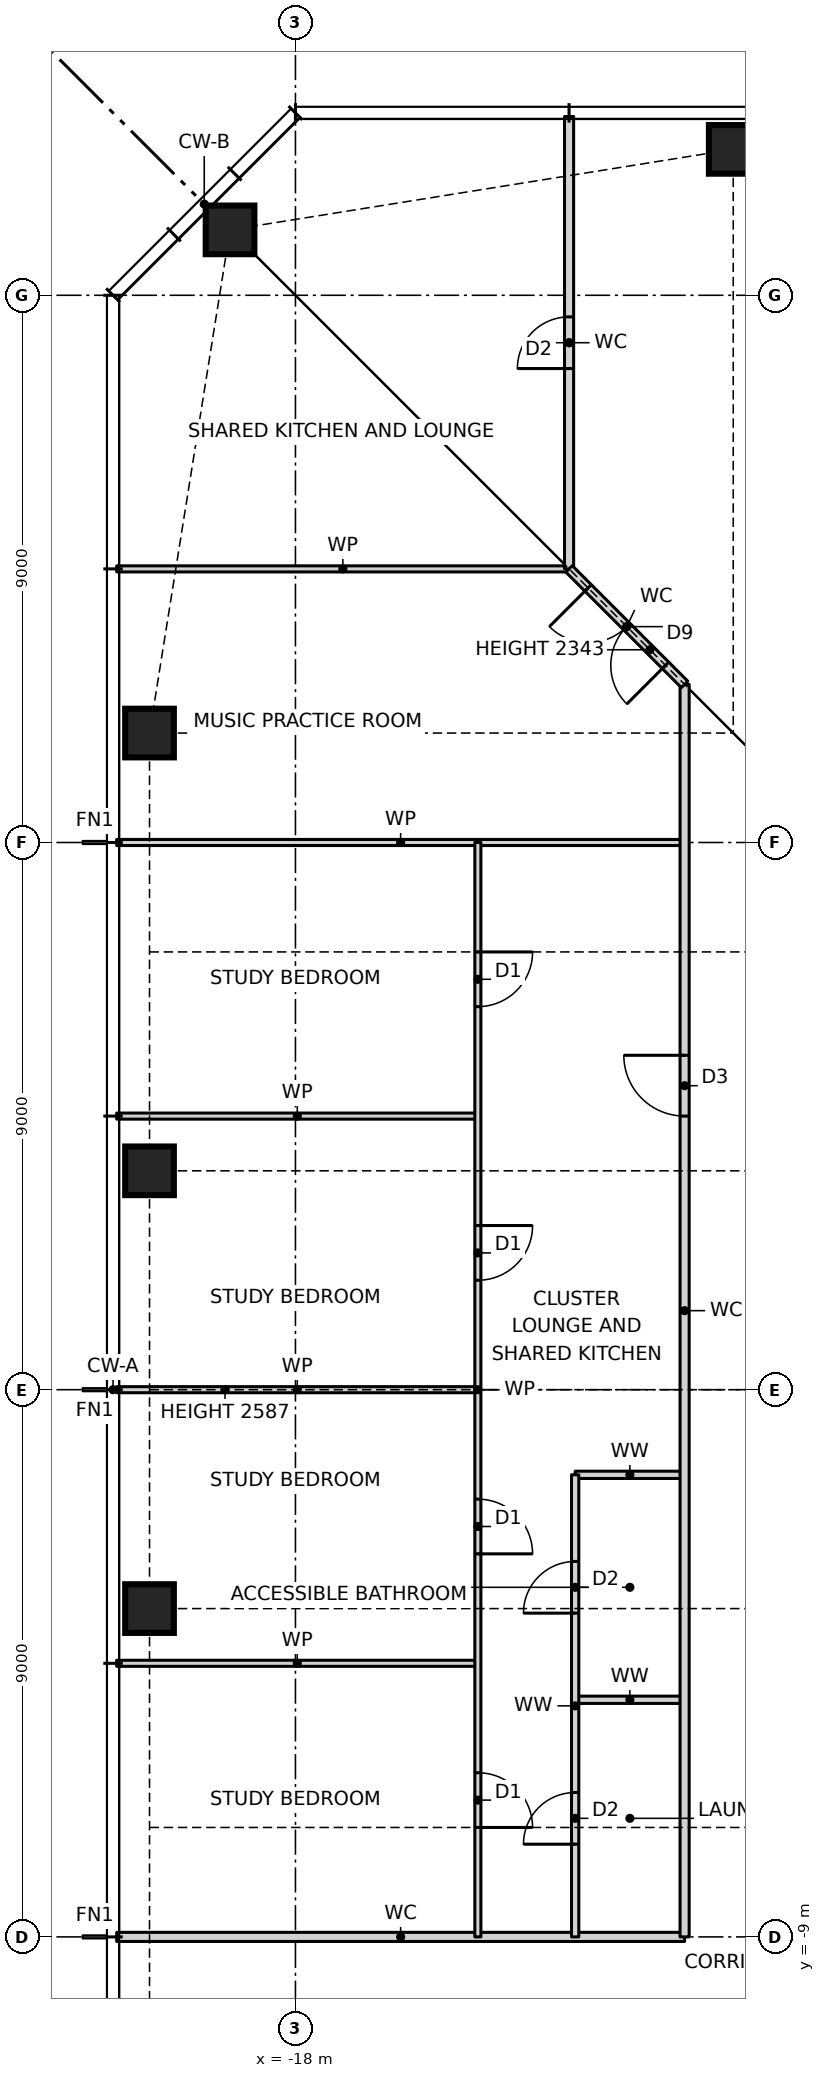
"""IFC4 building model, lengths in metres.
Left out: names, types, materials, properties, quantities, classifications, styles, units other than length and angle.
Written with IfcOpenShell. Run it as: python <this file> out.ifc"""

import sys

from ifc_helpers import new_model, si_unit, direction, frame, frame_2d, origin, origin_2d, place, context, subcontext, project, spatial, rectangle, hollow_rectangle, extrude, element, fill, save


model = new_model("IFC4")
c1 = context("Model", 3, precision=1e-05, world=origin(), true_north=direction((0.0, 1.0)))
c2 = subcontext(c1, "Body", "Model", "MODEL_VIEW")
j1 = project(units=[si_unit("LENGTHUNIT", "METRE"), si_unit("PLANEANGLEUNIT", "RADIAN")], contexts=[c1])
p1 = place(None, origin())
s1 = spatial("IfcSite", under=j1, at=p1, CompositionType="ELEMENT")
p2 = place(p1, origin())
s2 = spatial("IfcBuilding", under=s1, at=p2, CompositionType="ELEMENT")
p3 = place(p2, frame((0.0, 0.0, 112.0)))
s3 = spatial("IfcBuildingStorey", under=s2, at=p3, CompositionType="ELEMENT", Elevation=112.0)
for number, where, z_axis, x_axis in (
    (1, (-10.8, 20.4, 0.0), (0.0, 0.0, 1.0), (1.0, 0.0, 0.0)),
    (2, (-19.076, 19.076, 0.0), (0.0, 0.0, 1.0), (1.0, 0.0, 0.0)),
    (3, (-20.4, 10.8, 0.0), (0.0, 0.0, 1.0), (1.0, 0.0, 0.0)),
    (4, (-20.4, 3.6, 0.0), (0.0, 0.0, 1.0), (1.0, 0.0, 0.0)),
    (5, (-20.4, -3.6, 0.0), (0.0, 0.0, 1.0), (1.0, 0.0, 0.0)),
):
    element("IfcColumn", number, at=place(p3, frame(where, z_axis=z_axis, x_axis=x_axis)), inside=s3, PredefinedType="COLUMN", context=c2, shape_type="SweptSolid", body=[
        extrude(hollow_rectangle(XDim=0.8, YDim=0.8, WallThickness=0.07, at=origin_2d()), origin(), (0.0, 0.0, 1.0), 3.5),
    ])
p4 = place(p3, frame((-20.94, -9.0, 0.0), z_axis=(0.0, 0.0, 1.0), x_axis=(1.0, 0.0, 0.0)))
e6 = element("IfcWall", 6, at=p4, inside=s3, PredefinedType="PARTITIONING", context=c2, shape_type="SweptSolid", body=[
    extrude(rectangle(XDim=9.34, YDim=0.15, at=frame_2d((4.67, 0.0))), origin(), (0.0, 0.0, 1.0), 3.27),
])
p5 = place(p3, frame((-13.4, -5.1, 0.0), z_axis=(0.0, 0.0, 1.0), x_axis=(1.0, 0.0, 0.0)))
e7 = element("IfcWall", 7, at=p5, inside=s3, PredefinedType="PARTITIONING", context=c2, shape_type="SweptSolid", body=[
    extrude(rectangle(XDim=1.8, YDim=0.12, at=frame_2d((0.9, 0.0))), origin(), (0.0, 0.0, 1.0), 3.27),
])
p6 = place(p3, frame((-20.94, -4.5, 0.0), z_axis=(0.0, 0.0, 1.0), x_axis=(1.0, 0.0, 0.0)))
e8 = element("IfcWall", 8, at=p6, inside=s3, PredefinedType="PARTITIONING", context=c2, shape_type="SweptSolid", body=[
    extrude(rectangle(XDim=5.94, YDim=0.1, at=frame_2d((2.97, 0.0))), origin(), (0.0, 0.0, 1.0), 3.27),
])
p7 = place(p3, frame((-13.4, -1.4, 0.0), z_axis=(0.0, 0.0, 1.0), x_axis=(1.0, 0.0, 0.0)))
e9 = element("IfcWall", 9, at=p7, inside=s3, PredefinedType="PARTITIONING", context=c2, shape_type="SweptSolid", body=[
    extrude(rectangle(XDim=1.8, YDim=0.12, at=frame_2d((0.9, 0.0))), origin(), (0.0, 0.0, 1.0), 3.27),
])
p8 = place(p3, frame((-20.94, 0.0, 0.0), z_axis=(0.0, 0.0, 1.0), x_axis=(1.0, 0.0, 0.0)))
e10 = element("IfcWall", 10, at=p8, inside=s3, PredefinedType="PARTITIONING", context=c2, shape_type="SweptSolid", body=[
    extrude(rectangle(XDim=5.94, YDim=0.1, at=frame_2d((2.97, 0.0))), origin(), (0.0, 0.0, 1.0), 2.587),
])
p9 = place(p3, frame((-20.94, 4.5, 0.0), z_axis=(0.0, 0.0, 1.0), x_axis=(1.0, 0.0, 0.0)))
e11 = element("IfcWall", 11, at=p9, inside=s3, PredefinedType="PARTITIONING", context=c2, shape_type="SweptSolid", body=[
    extrude(rectangle(XDim=5.94, YDim=0.1, at=frame_2d((2.97, 0.0))), origin(), (0.0, 0.0, 1.0), 3.27),
])
p10 = place(p3, frame((-20.94, 9.0, 0.0), z_axis=(0.0, 0.0, 1.0), x_axis=(1.0, 0.0, 0.0)))
e12 = element("IfcWall", 12, at=p10, inside=s3, PredefinedType="PARTITIONING", context=c2, shape_type="SweptSolid", body=[
    extrude(rectangle(XDim=9.34, YDim=0.1, at=frame_2d((4.67, 0.0))), origin(), (0.0, 0.0, 1.0), 3.27),
])
p11 = place(p3, frame((-20.94, 13.5, 0.0), z_axis=(0.0, 0.0, 1.0), x_axis=(1.0, 0.0, 0.0)))
e13 = element("IfcWall", 13, at=p11, inside=s3, PredefinedType="PARTITIONING", context=c2, shape_type="SweptSolid", body=[
    extrude(rectangle(XDim=7.44, YDim=0.1, at=frame_2d((3.72, 0.0))), origin(), (0.0, 0.0, 1.0), 3.27),
])
p12 = place(p3, frame((-11.6, -9.0, 0.0), z_axis=(0.0, 0.0, 1.0), x_axis=(0.0, 1.0, 0.0)))
e14 = element("IfcWall", 14, at=p12, inside=s3, PredefinedType="PARTITIONING", context=c2, shape_type="SweptSolid", body=[
    extrude(rectangle(XDim=20.6, YDim=0.15, at=frame_2d((10.3, 0.0))), origin(), (0.0, 0.0, 1.0), 3.27),
])
p13 = place(p12, frame((13.5, 0.0, 0.0)))
e15 = element("IfcOpeningElement", 15, at=p13, cuts=e14, PredefinedType="OPENING", context=c2, shape_type="SweptSolid", body=[
    extrude(rectangle(XDim=1.0, YDim=2.1, at=frame_2d((0.5, 1.05))), frame((0.0, 0.085, 0.0), z_axis=(0.0, -1.0, 0.0), x_axis=(1.0, 0.0, 0.0)), (0.0, 0.0, 1.0), 0.17),
])
p14 = place(p3, frame((-13.4, -9.0, 0.0), z_axis=(0.0, 0.0, 1.0), x_axis=(0.0, 1.0, 0.0)))
e16 = element("IfcWall", 16, at=p14, inside=s3, PredefinedType="PARTITIONING", context=c2, shape_type="SweptSolid", body=[
    extrude(rectangle(XDim=7.6, YDim=0.12, at=frame_2d((3.8, 0.0))), origin(), (0.0, 0.0, 1.0), 3.27),
])
p15 = place(p14, frame((5.325, 0.0, 0.0)))
e17 = element("IfcOpeningElement", 17, at=p15, cuts=e16, PredefinedType="OPENING", context=c2, shape_type="SweptSolid", body=[
    extrude(rectangle(XDim=0.85, YDim=2.1, at=frame_2d((0.425, 1.05))), frame((0.0, 0.07, 0.0), z_axis=(0.0, -1.0, 0.0), x_axis=(1.0, 0.0, 0.0)), (0.0, 0.0, 1.0), 0.14),
])
p16 = place(p14, frame((1.525, 0.0, 0.0)))
e18 = element("IfcOpeningElement", 18, at=p16, cuts=e16, PredefinedType="OPENING", context=c2, shape_type="SweptSolid", body=[
    extrude(rectangle(XDim=0.85, YDim=2.1, at=frame_2d((0.425, 1.05))), frame((0.0, 0.07, 0.0), z_axis=(0.0, -1.0, 0.0), x_axis=(1.0, 0.0, 0.0)), (0.0, 0.0, 1.0), 0.14),
])
p17 = place(p3, frame((-13.5, 13.5, 0.0), z_axis=(0.0, 0.0, 1.0), x_axis=(0.0, 1.0, 0.0)))
e19 = element("IfcWall", 19, at=p17, inside=s3, PredefinedType="PARTITIONING", context=c2, shape_type="SweptSolid", body=[
    extrude(rectangle(XDim=7.44, YDim=0.15, at=frame_2d((3.72, 0.0))), origin(), (0.0, 0.0, 1.0), 3.27),
])
p18 = place(p17, frame((3.295, 0.0, 0.0)))
e20 = element("IfcOpeningElement", 20, at=p18, cuts=e19, PredefinedType="OPENING", context=c2, shape_type="SweptSolid", body=[
    extrude(rectangle(XDim=0.85, YDim=2.1, at=frame_2d((0.425, 1.05))), frame((0.0, 0.085, 0.0), z_axis=(0.0, -1.0, 0.0), x_axis=(1.0, 0.0, 0.0)), (0.0, 0.0, 1.0), 0.17),
])
p19 = place(p3, frame((-15.0, -9.0, 0.0), z_axis=(0.0, 0.0, 1.0), x_axis=(0.0, 1.0, 0.0)))
e21 = element("IfcWall", 21, at=p19, inside=s3, PredefinedType="PARTITIONING", context=c2, shape_type="SweptSolid", body=[
    extrude(rectangle(XDim=18.0, YDim=0.1, at=frame_2d((9.0, 0.0))), origin(), (0.0, 0.0, 1.0), 3.27),
])
p20 = place(p19, frame((15.3, 0.0, 0.0)))
e22 = element("IfcOpeningElement", 22, at=p20, cuts=e21, PredefinedType="OPENING", context=c2, shape_type="SweptSolid", body=[
    extrude(rectangle(XDim=0.9, YDim=2.1, at=frame_2d((0.45, 1.05))), frame((0.0, 0.06, 0.0), z_axis=(0.0, -1.0, 0.0), x_axis=(1.0, 0.0, 0.0)), (0.0, 0.0, 1.0), 0.12),
])
p21 = place(p19, frame((10.8, 0.0, 0.0)))
e23 = element("IfcOpeningElement", 23, at=p21, cuts=e21, PredefinedType="OPENING", context=c2, shape_type="SweptSolid", body=[
    extrude(rectangle(XDim=0.9, YDim=2.1, at=frame_2d((0.45, 1.05))), frame((0.0, 0.06, 0.0), z_axis=(0.0, -1.0, 0.0), x_axis=(1.0, 0.0, 0.0)), (0.0, 0.0, 1.0), 0.12),
])
p22 = place(p19, frame((6.3, 0.0, 0.0)))
e24 = element("IfcOpeningElement", 24, at=p22, cuts=e21, PredefinedType="OPENING", context=c2, shape_type="SweptSolid", body=[
    extrude(rectangle(XDim=0.9, YDim=2.1, at=frame_2d((0.45, 1.05))), frame((0.0, 0.06, 0.0), z_axis=(0.0, -1.0, 0.0), x_axis=(1.0, 0.0, 0.0)), (0.0, 0.0, 1.0), 0.12),
])
p23 = place(p19, frame((1.8, 0.0, 0.0)))
e25 = element("IfcOpeningElement", 25, at=p23, cuts=e21, PredefinedType="OPENING", context=c2, shape_type="SweptSolid", body=[
    extrude(rectangle(XDim=0.9, YDim=2.1, at=frame_2d((0.45, 1.05))), frame((0.0, 0.06, 0.0), z_axis=(0.0, -1.0, 0.0), x_axis=(1.0, 0.0, 0.0)), (0.0, 0.0, 1.0), 0.12),
])
p24 = place(p3, frame((-11.6, 11.6, 0.0), z_axis=(0.0, 0.0, 1.0), x_axis=(-0.707106781187, 0.707106781187, 0.0)))
e26 = element("IfcWall", 26, at=p24, inside=s3, PredefinedType="PARTITIONING", context=c2, shape_type="SweptSolid", body=[
    extrude(rectangle(XDim=2.687, YDim=0.15, at=frame_2d((1.343, 0.0))), origin(), (0.0, 0.0, 1.0), 2.343),
])
p25 = place(p24, frame((0.444, 0.0, 0.0)))
e27 = element("IfcOpeningElement", 27, at=p25, cuts=e26, PredefinedType="OPENING", context=c2, shape_type="SweptSolid", body=[
    extrude(rectangle(XDim=1.8, YDim=2.1, at=frame_2d((0.9, 1.05))), frame((0.0, 0.085, 0.0), z_axis=(0.0, -1.0, 0.0), x_axis=(1.0, 0.0, 0.0)), (0.0, 0.0, 1.0), 0.17),
])
p26 = place(p25, origin())
e28 = element("IfcDoor", 28, at=p26, inside=s3, OperationType="DOUBLE_DOOR_SINGLE_SWING", PredefinedType="DOOR", context=c2, shape_type="SweptSolid", body=[
    extrude(rectangle(XDim=1.8, YDim=2.1, at=frame_2d((0.9, 1.05))), frame((0.0, 0.025, 0.0), z_axis=(0.0, -1.0, 0.0), x_axis=(1.0, 0.0, 0.0)), (0.0, 0.0, 1.0), 0.05),
])
fill(e27, e28)
p27 = place(p20, frame((0.9, 0.0, 0.0), z_axis=(0.0, 0.0, 1.0), x_axis=(-1.0, 0.0, 0.0)))
e29 = element("IfcDoor", 29, at=p27, inside=s3, OperationType="SINGLE_SWING_LEFT", PredefinedType="DOOR", context=c2, shape_type="SweptSolid", body=[
    extrude(rectangle(XDim=0.9, YDim=2.1, at=frame_2d((0.45, 1.05))), frame((0.0, 0.025, 0.0), z_axis=(0.0, -1.0, 0.0), x_axis=(1.0, 0.0, 0.0)), (0.0, 0.0, 1.0), 0.05),
])
fill(e22, e29)
p28 = place(p21, frame((0.9, 0.0, 0.0), z_axis=(0.0, 0.0, 1.0), x_axis=(-1.0, 0.0, 0.0)))
e30 = element("IfcDoor", 30, at=p28, inside=s3, OperationType="SINGLE_SWING_LEFT", PredefinedType="DOOR", context=c2, shape_type="SweptSolid", body=[
    extrude(rectangle(XDim=0.9, YDim=2.1, at=frame_2d((0.45, 1.05))), frame((0.0, 0.025, 0.0), z_axis=(0.0, -1.0, 0.0), x_axis=(1.0, 0.0, 0.0)), (0.0, 0.0, 1.0), 0.05),
])
fill(e23, e30)
p29 = place(p22, frame((0.9, 0.0, 0.0), z_axis=(0.0, 0.0, 1.0), x_axis=(-1.0, 0.0, 0.0)))
e31 = element("IfcDoor", 31, at=p29, inside=s3, OperationType="SINGLE_SWING_RIGHT", PredefinedType="DOOR", context=c2, shape_type="SweptSolid", body=[
    extrude(rectangle(XDim=0.9, YDim=2.1, at=frame_2d((0.45, 1.05))), frame((0.0, 0.025, 0.0), z_axis=(0.0, -1.0, 0.0), x_axis=(1.0, 0.0, 0.0)), (0.0, 0.0, 1.0), 0.05),
])
fill(e24, e31)
p30 = place(p23, frame((0.9, 0.0, 0.0), z_axis=(0.0, 0.0, 1.0), x_axis=(-1.0, 0.0, 0.0)))
e32 = element("IfcDoor", 32, at=p30, inside=s3, OperationType="SINGLE_SWING_RIGHT", PredefinedType="DOOR", context=c2, shape_type="SweptSolid", body=[
    extrude(rectangle(XDim=0.9, YDim=2.1, at=frame_2d((0.45, 1.05))), frame((0.0, 0.025, 0.0), z_axis=(0.0, -1.0, 0.0), x_axis=(1.0, 0.0, 0.0)), (0.0, 0.0, 1.0), 0.05),
])
fill(e25, e32)
p31 = place(p13, origin())
e33 = element("IfcDoor", 33, at=p31, inside=s3, OperationType="SINGLE_SWING_RIGHT", PredefinedType="DOOR", context=c2, shape_type="SweptSolid", body=[
    extrude(rectangle(XDim=1.0, YDim=2.1, at=frame_2d((0.5, 1.05))), frame((0.0, 0.025, 0.0), z_axis=(0.0, -1.0, 0.0), x_axis=(1.0, 0.0, 0.0)), (0.0, 0.0, 1.0), 0.05),
])
fill(e15, e33)
p32 = place(p15, origin())
e34 = element("IfcDoor", 34, at=p32, inside=s3, OperationType="SINGLE_SWING_LEFT", PredefinedType="DOOR", context=c2, shape_type="SweptSolid", body=[
    extrude(rectangle(XDim=0.85, YDim=2.1, at=frame_2d((0.425, 1.05))), frame((0.0, 0.025, 0.0), z_axis=(0.0, -1.0, 0.0), x_axis=(1.0, 0.0, 0.0)), (0.0, 0.0, 1.0), 0.05),
])
fill(e17, e34)
p33 = place(p16, origin())
e35 = element("IfcDoor", 35, at=p33, inside=s3, OperationType="SINGLE_SWING_LEFT", PredefinedType="DOOR", context=c2, shape_type="SweptSolid", body=[
    extrude(rectangle(XDim=0.85, YDim=2.1, at=frame_2d((0.425, 1.05))), frame((0.0, 0.025, 0.0), z_axis=(0.0, -1.0, 0.0), x_axis=(1.0, 0.0, 0.0)), (0.0, 0.0, 1.0), 0.05),
])
fill(e18, e35)
p34 = place(p18, origin())
e36 = element("IfcDoor", 36, at=p34, inside=s3, OperationType="SINGLE_SWING_LEFT", PredefinedType="DOOR", context=c2, shape_type="SweptSolid", body=[
    extrude(rectangle(XDim=0.85, YDim=2.1, at=frame_2d((0.425, 1.05))), frame((0.0, 0.025, 0.0), z_axis=(0.0, -1.0, 0.0), x_axis=(1.0, 0.0, 0.0)), (0.0, 0.0, 1.0), 0.05),
])
fill(e20, e36)
save(model, sys.argv[1])
